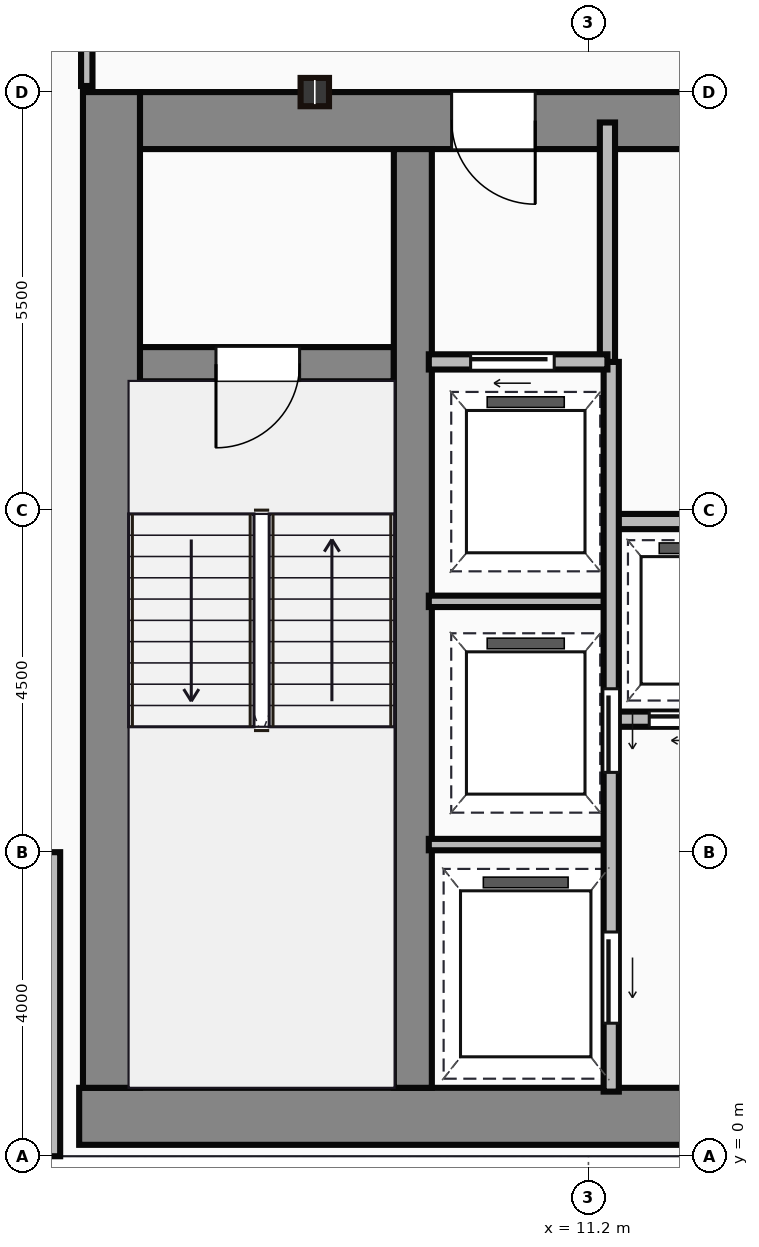
"""IFC4 building model, lengths in metres.
Left out: names, types, materials, properties, quantities, classifications, styles, units other than length and angle.
Written with IfcOpenShell. Run it as: python <this file> out.ifc"""

import sys

from ifc_helpers import new_model, si_unit, direction, frame, frame_2d, origin, origin_2d, place, context, subcontext, project, spatial, rectangle, i_section, extrude, source, transform, mapped, element, fill, save


model = new_model("IFC4")
c1 = context("Model", 3, precision=1e-05, world=origin(), true_north=direction((0.0, 1.0)))
c2 = subcontext(c1, "Body", "Model", "MODEL_VIEW")
j1 = project(units=[si_unit("LENGTHUNIT", "METRE"), si_unit("PLANEANGLEUNIT", "RADIAN")], contexts=[c1])
p1 = place(None, origin())
s1 = spatial("IfcSite", under=j1, at=p1, CompositionType="ELEMENT")
p2 = place(p1, origin())
s2 = spatial("IfcBuilding", under=s1, at=p2, CompositionType="ELEMENT")
p3 = place(p2, frame((0.0, 0.0, 177.1)))
s3 = spatial("IfcBuildingStorey", under=s2, at=p3, CompositionType="ELEMENT", Elevation=177.1)
m1 = source(origin(), c2, "Body", "SweptSolid", [
    extrude(rectangle(XDim=29.5, YDim=0.75, at=frame_2d((14.75, 0.0))), origin(), (0.0, 0.0, 1.0), 3.65),
])
p4 = place(p3, frame((4.5, 0.525, 0.0), z_axis=(0.0, 0.0, 1.0), x_axis=(1.0, 0.0, 0.0)))
e1 = element("IfcWall", 1, at=p4, inside=s3, PredefinedType="SHEAR", context=c2, shape_type="MappedRepresentation", body=[
    mapped(m1, transform((0.0, 0.0, 0.0))),
])
m2 = source(origin(), c2, "Body", "SweptSolid", [
    extrude(rectangle(XDim=13.1, YDim=0.75, at=frame_2d((6.55, 0.0))), origin(), (0.0, 0.0, 1.0), 3.65),
])
p5 = place(p3, frame((4.925, 0.9, 0.0), z_axis=(0.0, 0.0, 1.0), x_axis=(0.0, 1.0, 0.0)))
e2 = element("IfcWall", 2, at=p5, inside=s3, PredefinedType="SHEAR", context=c2, shape_type="MappedRepresentation", body=[
    mapped(m2, transform((0.0, 0.0, 0.0))),
])
m3 = source(origin(), c2, "Body", "SweptSolid", [
    extrude(rectangle(XDim=9.1, YDim=0.75, at=frame_2d((4.55, 0.0))), origin(), (0.0, 0.0, 1.0), 3.65),
])
p6 = place(p3, frame((5.3, 13.625, 0.0), z_axis=(0.0, 0.0, 1.0), x_axis=(1.0, 0.0, 0.0)))
e3 = element("IfcWall", 3, at=p6, inside=s3, PredefinedType="SHEAR", context=c2, shape_type="MappedRepresentation", body=[
    mapped(m3, transform((0.0, 0.0, 0.0))),
])
p7 = place(p6, frame((4.1, 0.0, 0.0)))
e4 = element("IfcOpeningElement", 4, at=p7, cuts=e3, PredefinedType="OPENING", context=c2, shape_type="SweptSolid", body=[
    extrude(rectangle(XDim=1.1, YDim=2.15, at=frame_2d((0.55, 1.075))), frame((0.0, 0.385, 0.0), z_axis=(0.0, -1.0, 0.0), x_axis=(1.0, 0.0, 0.0)), (0.0, 0.0, 1.0), 0.77),
])
m4 = source(origin(), c2, "Body", "SweptSolid", [
    extrude(rectangle(XDim=12.35, YDim=0.5, at=frame_2d((6.175, 0.0))), origin(), (0.0, 0.0, 1.0), 3.65),
])
p8 = place(p3, frame((8.89, 0.9, 0.0), z_axis=(0.0, 0.0, 1.0), x_axis=(0.0, 1.0, 0.0)))
e5 = element("IfcWall", 5, at=p8, inside=s3, PredefinedType="SHEAR", context=c2, shape_type="MappedRepresentation", body=[
    mapped(m4, transform((0.0, 0.0, 0.0))),
])
m5 = source(origin(), c2, "Body", "SweptSolid", [
    extrude(rectangle(XDim=3.39, YDim=0.45, at=frame_2d((1.695, 0.0))), origin(), (0.0, 0.0, 1.0), 3.65),
])
p9 = place(p3, frame((5.25, 10.42, 0.0), z_axis=(0.0, 0.0, 1.0), x_axis=(1.0, 0.0, 0.0)))
e6 = element("IfcWall", 6, at=p9, inside=s3, PredefinedType="SHEAR", context=c2, shape_type="MappedRepresentation", body=[
    mapped(m5, transform((0.0, 0.0, 0.0))),
])
p10 = place(p9, frame((1.05, 0.0, 0.0)))
e7 = element("IfcOpeningElement", 7, at=p10, cuts=e6, PredefinedType="OPENING", context=c2, shape_type="SweptSolid", body=[
    extrude(rectangle(XDim=1.1, YDim=2.15, at=frame_2d((0.55, 1.075))), frame((0.0, 0.235, 0.0), z_axis=(0.0, -1.0, 0.0), x_axis=(1.0, 0.0, 0.0)), (0.0, 0.0, 1.0), 0.47),
])
m6 = source(origin(), c2, "Body", "SweptSolid", [
    extrude(i_section(OverallWidth=0.374, OverallDepth=0.372, WebThickness=0.016, FlangeThickness=0.026, at=origin_2d()), origin(), (0.0, 0.0, 1.0), 3.65),
])
p11 = place(p3, frame((7.6, 14.0, 0.0), z_axis=(0.0, 0.0, 1.0), x_axis=(1.0, 0.0, 0.0)))
e8 = element("IfcColumn", 8, at=p11, inside=s3, PredefinedType="COLUMN", context=c2, shape_type="MappedRepresentation", body=[
    mapped(m6, transform((0.0, 0.0, 0.0))),
])
m7 = source(origin(), c2, "Body", "SweptSolid", [
    extrude(rectangle(XDim=4.0, YDim=0.25, at=frame_2d((2.0, 0.0))), origin(), (0.0, 0.0, 1.0), 3.4),
])
p12 = place(p3, frame((4.125, 4.0, 0.0), z_axis=(0.0, 0.0, 1.0), x_axis=(0.0, -1.0, 0.0)))
e9 = element("IfcWall", 9, at=p12, inside=s3, PredefinedType="STANDARD", context=c2, shape_type="MappedRepresentation", body=[
    mapped(m7, transform((0.0, 0.0, 0.0))),
])
m8 = source(origin(), c2, "Body", "SweptSolid", [
    extrude(rectangle(XDim=3.18, YDim=0.2, at=frame_2d((1.59, 0.0))), origin(), (0.0, 0.0, 1.0), 3.4),
])
p13 = place(p3, frame((11.45, 10.42, 0.0), z_axis=(0.0, 0.0, 1.0), x_axis=(0.0, 1.0, 0.0)))
e10 = element("IfcWall", 10, at=p13, inside=s3, PredefinedType="PARTITIONING", context=c2, shape_type="MappedRepresentation", body=[
    mapped(m8, transform((0.0, 0.0, 0.0))),
])
m9 = source(origin(), c2, "Body", "SweptSolid", [
    extrude(rectangle(XDim=2.35, YDim=0.2, at=frame_2d((1.175, 0.0))), origin(), (0.0, 0.0, 1.0), 3.4),
])
p14 = place(p3, frame((9.1, 10.45, 0.0), z_axis=(0.0, 0.0, 1.0), x_axis=(1.0, 0.0, 0.0)))
e11 = element("IfcWall", 11, at=p14, inside=s3, PredefinedType="PARTITIONING", context=c2, shape_type="MappedRepresentation", body=[
    mapped(m9, transform((0.0, 0.0, 0.0))),
])
p15 = place(p14, frame((0.55, 0.0, 0.0)))
e12 = element("IfcOpeningElement", 12, at=p15, cuts=e11, PredefinedType="OPENING", context=c2, shape_type="SweptSolid", body=[
    extrude(rectangle(XDim=1.1, YDim=2.15, at=frame_2d((0.55, 1.075))), frame((0.0, 0.11, 0.0), z_axis=(0.0, -1.0, 0.0), x_axis=(1.0, 0.0, 0.0)), (0.0, 0.0, 1.0), 0.22),
])
m10 = source(origin(), c2, "Body", "SweptSolid", [
    extrude(rectangle(XDim=9.6, YDim=0.2, at=frame_2d((4.8, 0.0))), origin(), (0.0, 0.0, 1.0), 3.4),
])
p16 = place(p3, frame((11.5, 0.85, 0.0), z_axis=(0.0, 0.0, 1.0), x_axis=(0.0, 1.0, 0.0)))
e13 = element("IfcWall", 13, at=p16, inside=s3, PredefinedType="PARTITIONING", context=c2, shape_type="MappedRepresentation", body=[
    mapped(m10, transform((0.0, 0.0, 0.0))),
])
p17 = place(p16, frame((4.2, 0.0, 0.0)))
e14 = element("IfcOpeningElement", 14, at=p17, cuts=e13, PredefinedType="OPENING", context=c2, shape_type="SweptSolid", body=[
    extrude(rectangle(XDim=1.1, YDim=2.15, at=frame_2d((0.55, 1.075))), frame((0.0, 0.11, 0.0), z_axis=(0.0, -1.0, 0.0), x_axis=(1.0, 0.0, 0.0)), (0.0, 0.0, 1.0), 0.22),
])
p18 = place(p16, frame((0.9, 0.0, 0.0)))
e15 = element("IfcOpeningElement", 15, at=p18, cuts=e13, PredefinedType="OPENING", context=c2, shape_type="SweptSolid", body=[
    extrude(rectangle(XDim=1.2, YDim=2.15, at=frame_2d((0.6, 1.075))), frame((0.0, 0.11, 0.0), z_axis=(0.0, -1.0, 0.0), x_axis=(1.0, 0.0, 0.0)), (0.0, 0.0, 1.0), 0.22),
])
m11 = source(origin(), c2, "Body", "SweptSolid", [
    extrude(rectangle(XDim=2.4, YDim=0.15, at=frame_2d((1.2, 0.0))), origin(), (0.0, 0.0, 1.0), 3.4),
])
for number, where, z_axis, x_axis in (
    (16, (9.1, 4.1, 0.0), (0.0, 0.0, 1.0), (1.0, 0.0, 0.0)),
    (17, (9.1, 7.3, 0.0), (0.0, 0.0, 1.0), (1.0, 0.0, 0.0)),
):
    element("IfcWall", number, at=place(p3, frame(where, z_axis=z_axis, x_axis=x_axis)), inside=s3, PredefinedType="PARTITIONING", context=c2, shape_type="MappedRepresentation", body=[
        mapped(m11, transform((0.0, 0.0, 0.0))),
    ])
m12 = source(origin(), c2, "Body", "SweptSolid", [
    extrude(rectangle(XDim=11.85, YDim=0.2, at=frame_2d((5.925, 0.0))), origin(), (0.0, 0.0, 1.0), 3.4),
])
p19 = place(p3, frame((11.55, 5.75, 0.0), z_axis=(0.0, 0.0, 1.0), x_axis=(1.0, 0.0, 0.0)))
e18 = element("IfcWall", 18, at=p19, inside=s3, PredefinedType="PARTITIONING", context=c2, shape_type="MappedRepresentation", body=[
    mapped(m12, transform((0.0, 0.0, 0.0))),
])
p20 = place(p19, frame((0.45, 0.0, 0.0)))
e19 = element("IfcOpeningElement", 19, at=p20, cuts=e18, PredefinedType="OPENING", context=c2, shape_type="SweptSolid", body=[
    extrude(rectangle(XDim=1.05, YDim=2.15, at=frame_2d((0.525, 1.075))), frame((0.0, 0.11, 0.0), z_axis=(0.0, -1.0, 0.0), x_axis=(1.0, 0.0, 0.0)), (0.0, 0.0, 1.0), 0.22),
])
p21 = place(p19, frame((2.4, 0.0, 0.0)))
e20 = element("IfcOpeningElement", 20, at=p21, cuts=e18, PredefinedType="OPENING", context=c2, shape_type="SweptSolid", body=[
    extrude(rectangle(XDim=1.05, YDim=2.15, at=frame_2d((0.525, 1.075))), frame((0.0, 0.11, 0.0), z_axis=(0.0, -1.0, 0.0), x_axis=(1.0, 0.0, 0.0)), (0.0, 0.0, 1.0), 0.22),
])
p22 = place(p19, frame((4.35, 0.0, 0.0)))
e21 = element("IfcOpeningElement", 21, at=p22, cuts=e18, PredefinedType="OPENING", context=c2, shape_type="SweptSolid", body=[
    extrude(rectangle(XDim=1.05, YDim=2.15, at=frame_2d((0.525, 1.075))), frame((0.0, 0.11, 0.0), z_axis=(0.0, -1.0, 0.0), x_axis=(1.0, 0.0, 0.0)), (0.0, 0.0, 1.0), 0.22),
])
p23 = place(p19, frame((6.3, 0.0, 0.0)))
e22 = element("IfcOpeningElement", 22, at=p23, cuts=e18, PredefinedType="OPENING", context=c2, shape_type="SweptSolid", body=[
    extrude(rectangle(XDim=1.05, YDim=2.15, at=frame_2d((0.525, 1.075))), frame((0.0, 0.11, 0.0), z_axis=(0.0, -1.0, 0.0), x_axis=(1.0, 0.0, 0.0)), (0.0, 0.0, 1.0), 0.22),
])
p24 = place(p19, frame((8.25, 0.0, 0.0)))
e23 = element("IfcOpeningElement", 23, at=p24, cuts=e18, PredefinedType="OPENING", context=c2, shape_type="SweptSolid", body=[
    extrude(rectangle(XDim=1.05, YDim=2.15, at=frame_2d((0.525, 1.075))), frame((0.0, 0.11, 0.0), z_axis=(0.0, -1.0, 0.0), x_axis=(1.0, 0.0, 0.0)), (0.0, 0.0, 1.0), 0.22),
])
p25 = place(p19, frame((10.2, 0.0, 0.0)))
e24 = element("IfcOpeningElement", 24, at=p25, cuts=e18, PredefinedType="OPENING", context=c2, shape_type="SweptSolid", body=[
    extrude(rectangle(XDim=1.05, YDim=2.15, at=frame_2d((0.525, 1.075))), frame((0.0, 0.11, 0.0), z_axis=(0.0, -1.0, 0.0), x_axis=(1.0, 0.0, 0.0)), (0.0, 0.0, 1.0), 0.22),
])
p26 = place(p3, frame((11.55, 8.35, 0.0), z_axis=(0.0, 0.0, 1.0), x_axis=(1.0, 0.0, 0.0)))
e25 = element("IfcWall", 25, at=p26, inside=s3, PredefinedType="PARTITIONING", context=c2, shape_type="MappedRepresentation", body=[
    mapped(m12, transform((0.0, 0.0, 0.0))),
])
m13 = source(origin(), c2, "Body", "SweptSolid", [
    extrude(rectangle(XDim=2.22, YDim=0.15, at=frame_2d((1.11, 0.0))), origin(), (0.0, 0.0, 1.0), 3.4),
])
p27 = place(p3, frame((4.6, 14.08, 0.0), z_axis=(0.0, 0.0, 1.0), x_axis=(0.0, 1.0, 0.0)))
e26 = element("IfcWall", 26, at=p27, inside=s3, PredefinedType="PARTITIONING", context=c2, shape_type="MappedRepresentation", body=[
    mapped(m13, transform((0.0, 0.0, 0.0))),
])
m14 = source(origin(), c2, "Body", "SweptSolid", [
    extrude(rectangle(XDim=1.1, YDim=2.15, at=frame_2d((0.55, 1.075))), frame((0.0, 0.025, 0.0), z_axis=(0.0, -1.0, 0.0), x_axis=(1.0, 0.0, 0.0)), (0.0, 0.0, 1.0), 0.05),
])
p28 = place(p10, frame((1.1, 0.0, 0.0), z_axis=(0.0, 0.0, 1.0), x_axis=(-1.0, 0.0, 0.0)))
e27 = element("IfcDoor", 27, at=p28, inside=s3, OperationType="SINGLE_SWING_LEFT", PredefinedType="DOOR", context=c2, shape_type="MappedRepresentation", body=[
    mapped(m14, transform((0.0, 0.0, 0.0))),
])
fill(e7, e27)
p29 = place(p7, origin())
e28 = element("IfcDoor", 28, at=p29, inside=s3, OperationType="SINGLE_SWING_RIGHT", PredefinedType="DOOR", context=c2, shape_type="MappedRepresentation", body=[
    mapped(m14, transform((0.0, 0.0, 0.0))),
])
fill(e4, e28)
p30 = place(p15, origin())
e29 = element("IfcDoor", 29, at=p30, inside=s3, OperationType="SLIDING_TO_LEFT", PredefinedType="DOOR", context=c2, shape_type="MappedRepresentation", body=[
    mapped(m14, transform((0.0, 0.0, 0.0))),
])
fill(e12, e29)
p31 = place(p17, frame((1.1, 0.0, 0.0), z_axis=(0.0, 0.0, 1.0), x_axis=(-1.0, 0.0, 0.0)))
e30 = element("IfcDoor", 30, at=p31, inside=s3, OperationType="SLIDING_TO_LEFT", PredefinedType="DOOR", context=c2, shape_type="MappedRepresentation", body=[
    mapped(m14, transform((0.0, 0.0, 0.0))),
])
fill(e14, e30)
m15 = source(origin(), c2, "Body", "SweptSolid", [
    extrude(rectangle(XDim=1.2, YDim=2.15, at=frame_2d((0.6, 1.075))), frame((0.0, 0.025, 0.0), z_axis=(0.0, -1.0, 0.0), x_axis=(1.0, 0.0, 0.0)), (0.0, 0.0, 1.0), 0.05),
])
p32 = place(p18, frame((1.2, 0.0, 0.0), z_axis=(0.0, 0.0, 1.0), x_axis=(-1.0, 0.0, 0.0)))
e31 = element("IfcDoor", 31, at=p32, inside=s3, OperationType="SLIDING_TO_LEFT", PredefinedType="DOOR", context=c2, shape_type="MappedRepresentation", body=[
    mapped(m15, transform((0.0, 0.0, 0.0))),
])
fill(e15, e31)
m16 = source(origin(), c2, "Body", "SweptSolid", [
    extrude(rectangle(XDim=1.05, YDim=2.15, at=frame_2d((0.525, 1.075))), frame((0.0, 0.025, 0.0), z_axis=(0.0, -1.0, 0.0), x_axis=(1.0, 0.0, 0.0)), (0.0, 0.0, 1.0), 0.05),
])
p33 = place(p20, frame((1.05, 0.0, 0.0), z_axis=(0.0, 0.0, 1.0), x_axis=(-1.0, 0.0, 0.0)))
e32 = element("IfcDoor", 32, at=p33, inside=s3, OperationType="SLIDING_TO_LEFT", PredefinedType="DOOR", context=c2, shape_type="MappedRepresentation", body=[
    mapped(m16, transform((0.0, 0.0, 0.0))),
])
fill(e19, e32)
save(model, sys.argv[1])
